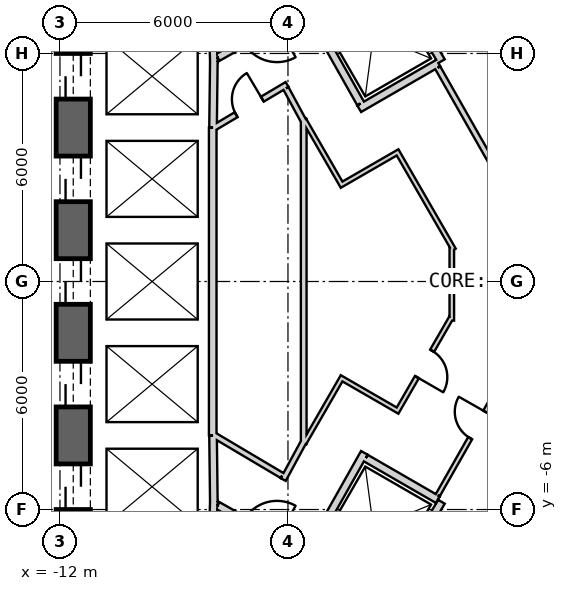
"""IFC4 building model, lengths in metres.
Left out: names, types, materials, properties, quantities, classifications, styles, units other than length and angle.
Written with IfcOpenShell. Run it as: python <this file> out.ifc"""

import sys

from ifc_helpers import new_model, si_unit, direction, frame, frame_2d, origin, place, context, subcontext, project, spatial, rectangle, extrude, element, fill, save


model = new_model("IFC4")
c1 = context("Model", 3, precision=1e-05, world=origin(), true_north=direction((0.0, 1.0)))
c2 = subcontext(c1, "Body", "Model", "MODEL_VIEW")
j1 = project(units=[si_unit("LENGTHUNIT", "METRE"), si_unit("PLANEANGLEUNIT", "RADIAN")], contexts=[c1])
p1 = place(None, origin())
s1 = spatial("IfcSite", under=j1, at=p1, CompositionType="ELEMENT")
p2 = place(p1, origin())
s2 = spatial("IfcBuilding", under=s1, at=p2, CompositionType="ELEMENT")
p3 = place(p2, frame((0.0, 0.0, 277.2)))
s3 = spatial("IfcBuildingStorey", under=s2, at=p3, CompositionType="ELEMENT", Elevation=277.2)
p4 = place(p3, frame((19.475, 2.208, 0.0), z_axis=(0.0, 0.0, 1.0), x_axis=(-0.866028369851, 0.499994862586, 0.0)))
e1 = element("IfcWall", 1, at=p4, inside=s3, PredefinedType="SHEAR", context=c2, shape_type="SweptSolid", body=[
    extrude(rectangle(XDim=31.523, YDim=0.9, at=frame_2d((15.762, 0.0))), origin(), (0.0, 0.0, 1.0), 6.5),
])
p5 = place(p4, frame((7.062, 0.0, 0.0)))
e2 = element("IfcOpeningElement", 2, at=p5, cuts=e1, PredefinedType="OPENING", context=c2, shape_type="SweptSolid", body=[
    extrude(rectangle(XDim=1.2, YDim=2.4, at=frame_2d((0.6, 1.2))), frame((0.0, 0.46, 0.0), z_axis=(0.0, -1.0, 0.0), x_axis=(1.0, 0.0, 0.0)), (0.0, 0.0, 1.0), 0.92),
])
p6 = place(p4, frame((3.612, 0.0, 0.0)))
e3 = element("IfcOpeningElement", 3, at=p6, cuts=e1, PredefinedType="OPENING", context=c2, shape_type="SweptSolid", body=[
    extrude(rectangle(XDim=1.2, YDim=2.4, at=frame_2d((0.6, 1.2))), frame((0.0, 0.46, 0.0), z_axis=(0.0, -1.0, 0.0), x_axis=(1.0, 0.0, 0.0)), (0.0, 0.0, 1.0), 0.92),
])
p7 = place(p4, frame((26.712, 0.0, 0.0)))
e4 = element("IfcOpeningElement", 4, at=p7, cuts=e1, PredefinedType="OPENING", context=c2, shape_type="SweptSolid", body=[
    extrude(rectangle(XDim=1.2, YDim=2.4, at=frame_2d((0.6, 1.2))), frame((0.0, 0.46, 0.0), z_axis=(0.0, -1.0, 0.0), x_axis=(1.0, 0.0, 0.0)), (0.0, 0.0, 1.0), 0.92),
])
p8 = place(p3, frame((-11.65, 15.762, 0.0), z_axis=(0.0, 0.0, 1.0), x_axis=(0.0, -1.0, 0.0)))
e5 = element("IfcWall", 5, at=p8, inside=s3, PredefinedType="SHEAR", context=c2, shape_type="SweptSolid", body=[
    extrude(rectangle(XDim=31.523, YDim=0.9, at=frame_2d((15.762, 0.0))), origin(), (0.0, 0.0, 1.0), 6.5),
])
p9 = place(p8, frame((7.062, 0.0, 0.0)))
e6 = element("IfcOpeningElement", 6, at=p9, cuts=e5, PredefinedType="OPENING", context=c2, shape_type="SweptSolid", body=[
    extrude(rectangle(XDim=1.2, YDim=2.4, at=frame_2d((0.6, 1.2))), frame((0.0, 0.46, 0.0), z_axis=(0.0, -1.0, 0.0), x_axis=(1.0, 0.0, 0.0)), (0.0, 0.0, 1.0), 0.92),
])
p10 = place(p8, frame((9.762, 0.0, 0.0)))
e7 = element("IfcOpeningElement", 7, at=p10, cuts=e5, PredefinedType="OPENING", context=c2, shape_type="SweptSolid", body=[
    extrude(rectangle(XDim=1.2, YDim=2.4, at=frame_2d((0.6, 1.2))), frame((0.0, 0.46, 0.0), z_axis=(0.0, -1.0, 0.0), x_axis=(1.0, 0.0, 0.0)), (0.0, 0.0, 1.0), 0.92),
])
p11 = place(p8, frame((12.462, 0.0, 0.0)))
e8 = element("IfcOpeningElement", 8, at=p11, cuts=e5, PredefinedType="OPENING", context=c2, shape_type="SweptSolid", body=[
    extrude(rectangle(XDim=1.2, YDim=2.4, at=frame_2d((0.6, 1.2))), frame((0.0, 0.46, 0.0), z_axis=(0.0, -1.0, 0.0), x_axis=(1.0, 0.0, 0.0)), (0.0, 0.0, 1.0), 0.92),
])
p12 = place(p8, frame((15.162, 0.0, 0.0)))
e9 = element("IfcOpeningElement", 9, at=p12, cuts=e5, PredefinedType="OPENING", context=c2, shape_type="SweptSolid", body=[
    extrude(rectangle(XDim=1.2, YDim=2.4, at=frame_2d((0.6, 1.2))), frame((0.0, 0.46, 0.0), z_axis=(0.0, -1.0, 0.0), x_axis=(1.0, 0.0, 0.0)), (0.0, 0.0, 1.0), 0.92),
])
p13 = place(p8, frame((17.862, 0.0, 0.0)))
e10 = element("IfcOpeningElement", 10, at=p13, cuts=e5, PredefinedType="OPENING", context=c2, shape_type="SweptSolid", body=[
    extrude(rectangle(XDim=1.2, YDim=2.4, at=frame_2d((0.6, 1.2))), frame((0.0, 0.46, 0.0), z_axis=(0.0, -1.0, 0.0), x_axis=(1.0, 0.0, 0.0)), (0.0, 0.0, 1.0), 0.92),
])
p14 = place(p8, frame((20.562, 0.0, 0.0)))
e11 = element("IfcOpeningElement", 11, at=p14, cuts=e5, PredefinedType="OPENING", context=c2, shape_type="SweptSolid", body=[
    extrude(rectangle(XDim=1.2, YDim=2.4, at=frame_2d((0.6, 1.2))), frame((0.0, 0.46, 0.0), z_axis=(0.0, -1.0, 0.0), x_axis=(1.0, 0.0, 0.0)), (0.0, 0.0, 1.0), 0.92),
])
p15 = place(p8, frame((23.262, 0.0, 0.0)))
e12 = element("IfcOpeningElement", 12, at=p15, cuts=e5, PredefinedType="OPENING", context=c2, shape_type="SweptSolid", body=[
    extrude(rectangle(XDim=1.2, YDim=2.4, at=frame_2d((0.6, 1.2))), frame((0.0, 0.46, 0.0), z_axis=(0.0, -1.0, 0.0), x_axis=(1.0, 0.0, 0.0)), (0.0, 0.0, 1.0), 0.92),
])
p16 = place(p8, frame((3.612, 0.0, 0.0)))
e13 = element("IfcOpeningElement", 13, at=p16, cuts=e5, PredefinedType="OPENING", context=c2, shape_type="SweptSolid", body=[
    extrude(rectangle(XDim=1.2, YDim=2.4, at=frame_2d((0.6, 1.2))), frame((0.0, 0.46, 0.0), z_axis=(0.0, -1.0, 0.0), x_axis=(1.0, 0.0, 0.0)), (0.0, 0.0, 1.0), 0.92),
])
p17 = place(p8, frame((26.712, 0.0, 0.0)))
e14 = element("IfcOpeningElement", 14, at=p17, cuts=e5, PredefinedType="OPENING", context=c2, shape_type="SweptSolid", body=[
    extrude(rectangle(XDim=1.2, YDim=2.4, at=frame_2d((0.6, 1.2))), frame((0.0, 0.46, 0.0), z_axis=(0.0, -1.0, 0.0), x_axis=(1.0, 0.0, 0.0)), (0.0, 0.0, 1.0), 0.92),
])
p18 = place(p3, frame((-7.825, -17.97, 0.0), z_axis=(0.0, 0.0, 1.0), x_axis=(0.866028369851, 0.499994862586, 0.0)))
e15 = element("IfcWall", 15, at=p18, inside=s3, PredefinedType="SHEAR", context=c2, shape_type="SweptSolid", body=[
    extrude(rectangle(XDim=31.523, YDim=0.9, at=frame_2d((15.762, 0.0))), origin(), (0.0, 0.0, 1.0), 6.5),
])
p19 = place(p18, frame((7.062, 0.0, 0.0)))
e16 = element("IfcOpeningElement", 16, at=p19, cuts=e15, PredefinedType="OPENING", context=c2, shape_type="SweptSolid", body=[
    extrude(rectangle(XDim=1.2, YDim=2.4, at=frame_2d((0.6, 1.2))), frame((0.0, 0.46, 0.0), z_axis=(0.0, -1.0, 0.0), x_axis=(1.0, 0.0, 0.0)), (0.0, 0.0, 1.0), 0.92),
])
p20 = place(p18, frame((9.762, 0.0, 0.0)))
e17 = element("IfcOpeningElement", 17, at=p20, cuts=e15, PredefinedType="OPENING", context=c2, shape_type="SweptSolid", body=[
    extrude(rectangle(XDim=1.2, YDim=2.4, at=frame_2d((0.6, 1.2))), frame((0.0, 0.46, 0.0), z_axis=(0.0, -1.0, 0.0), x_axis=(1.0, 0.0, 0.0)), (0.0, 0.0, 1.0), 0.92),
])
p21 = place(p18, frame((12.462, 0.0, 0.0)))
e18 = element("IfcOpeningElement", 18, at=p21, cuts=e15, PredefinedType="OPENING", context=c2, shape_type="SweptSolid", body=[
    extrude(rectangle(XDim=1.2, YDim=2.4, at=frame_2d((0.6, 1.2))), frame((0.0, 0.46, 0.0), z_axis=(0.0, -1.0, 0.0), x_axis=(1.0, 0.0, 0.0)), (0.0, 0.0, 1.0), 0.92),
])
p22 = place(p18, frame((15.162, 0.0, 0.0)))
e19 = element("IfcOpeningElement", 19, at=p22, cuts=e15, PredefinedType="OPENING", context=c2, shape_type="SweptSolid", body=[
    extrude(rectangle(XDim=1.2, YDim=2.4, at=frame_2d((0.6, 1.2))), frame((0.0, 0.46, 0.0), z_axis=(0.0, -1.0, 0.0), x_axis=(1.0, 0.0, 0.0)), (0.0, 0.0, 1.0), 0.92),
])
p23 = place(p18, frame((17.862, 0.0, 0.0)))
e20 = element("IfcOpeningElement", 20, at=p23, cuts=e15, PredefinedType="OPENING", context=c2, shape_type="SweptSolid", body=[
    extrude(rectangle(XDim=1.2, YDim=2.4, at=frame_2d((0.6, 1.2))), frame((0.0, 0.46, 0.0), z_axis=(0.0, -1.0, 0.0), x_axis=(1.0, 0.0, 0.0)), (0.0, 0.0, 1.0), 0.92),
])
p24 = place(p18, frame((20.562, 0.0, 0.0)))
e21 = element("IfcOpeningElement", 21, at=p24, cuts=e15, PredefinedType="OPENING", context=c2, shape_type="SweptSolid", body=[
    extrude(rectangle(XDim=1.2, YDim=2.4, at=frame_2d((0.6, 1.2))), frame((0.0, 0.46, 0.0), z_axis=(0.0, -1.0, 0.0), x_axis=(1.0, 0.0, 0.0)), (0.0, 0.0, 1.0), 0.92),
])
p25 = place(p18, frame((26.712, 0.0, 0.0)))
e22 = element("IfcOpeningElement", 22, at=p25, cuts=e15, PredefinedType="OPENING", context=c2, shape_type="SweptSolid", body=[
    extrude(rectangle(XDim=1.2, YDim=2.4, at=frame_2d((0.6, 1.2))), frame((0.0, 0.46, 0.0), z_axis=(0.0, -1.0, 0.0), x_axis=(1.0, 0.0, 0.0)), (0.0, 0.0, 1.0), 0.92),
])
p26 = place(p18, frame((3.612, 0.0, 0.0)))
e23 = element("IfcOpeningElement", 23, at=p26, cuts=e15, PredefinedType="OPENING", context=c2, shape_type="SweptSolid", body=[
    extrude(rectangle(XDim=1.2, YDim=2.4, at=frame_2d((0.6, 1.2))), frame((0.0, 0.46, 0.0), z_axis=(0.0, -1.0, 0.0), x_axis=(1.0, 0.0, 0.0)), (0.0, 0.0, 1.0), 0.92),
])
p27 = place(p3, frame((-7.977, 6.65, 0.0), z_axis=(0.0, 0.0, 1.0), x_axis=(0.030861509705, -0.999523670164, 0.0)))
e24 = element("IfcWall", 24, at=p27, inside=s3, PredefinedType="PLUMBINGWALL", context=c2, shape_type="SweptSolid", body=[
    extrude(rectangle(XDim=0.878, YDim=0.2, at=frame_2d((0.439, 0.0))), origin(), (0.0, 0.0, 1.0), 6.1),
])
p28 = place(p3, frame((-7.949, 5.895, 0.0), z_axis=(0.0, 0.0, 1.0), x_axis=(-0.012042535896, -0.999927486035, 0.0)))
e25 = element("IfcWall", 25, at=p28, inside=s3, PredefinedType="PLUMBINGWALL", context=c2, shape_type="SweptSolid", body=[
    extrude(rectangle(XDim=1.845, YDim=0.2, at=frame_2d((0.922, 0.0))), origin(), (0.0, 0.0, 1.0), 6.1),
])
p29 = place(p3, frame((-7.98, 4.05, 0.0), z_axis=(0.0, 0.0, 1.0), x_axis=(0.0, -1.0, 0.0)))
e26 = element("IfcWall", 26, at=p29, inside=s3, PredefinedType="PLUMBINGWALL", context=c2, shape_type="SweptSolid", body=[
    extrude(rectangle(XDim=8.1, YDim=0.2, at=frame_2d((4.05, 0.0))), origin(), (0.0, 0.0, 1.0), 6.1),
])
p30 = place(p3, frame((-7.95, -5.772, 0.0), z_axis=(0.0, 0.0, 1.0), x_axis=(-0.030803413295, -0.999525462272, 0.0)))
e27 = element("IfcWall", 27, at=p30, inside=s3, PredefinedType="PLUMBINGWALL", context=c2, shape_type="SweptSolid", body=[
    extrude(rectangle(XDim=1.078, YDim=0.2, at=frame_2d((0.539, 0.0))), origin(), (0.0, 0.0, 1.0), 6.1),
])
p31 = place(p3, frame((-7.971, -4.05, 0.0), z_axis=(0.0, 0.0, 1.0), x_axis=(0.012042535896, -0.999927486035, 0.0)))
e28 = element("IfcWall", 28, at=p31, inside=s3, PredefinedType="PLUMBINGWALL", context=c2, shape_type="SweptSolid", body=[
    extrude(rectangle(XDim=1.845, YDim=0.2, at=frame_2d((0.922, 0.0))), origin(), (0.0, 0.0, 1.0), 6.1),
])
p32 = place(p3, frame((-3.538, 8.465, 0.0), z_axis=(0.0, 0.0, 1.0), x_axis=(0.508647062354, -0.860975125052, 0.0)))
e29 = element("IfcWall", 29, at=p32, inside=s3, PredefinedType="PLUMBINGWALL", context=c2, shape_type="SweptSolid", body=[
    extrude(rectangle(XDim=3.1, YDim=0.2, at=frame_2d((1.55, 0.0))), origin(), (0.0, 0.0, 1.0), 6.1),
])
p33 = place(p3, frame((-2.043, 5.748, 0.0), z_axis=(0.0, 0.0, 1.0), x_axis=(-0.866035096217, -0.499983211839, 0.0)))
e30 = element("IfcWall", 30, at=p33, inside=s3, PredefinedType="PLUMBINGWALL", context=c2, shape_type="SweptSolid", body=[
    extrude(rectangle(XDim=2.404, YDim=0.2, at=frame_2d((1.202, 0.0))), origin(), (0.0, 0.0, 1.0), 6.1),
])
p34 = place(p3, frame((-5.562, 7.296, 0.0), z_axis=(0.0, 0.0, 1.0), x_axis=(0.49134651263, -0.870964180966, 0.0)))
e31 = element("IfcWall", 31, at=p34, inside=s3, PredefinedType="PLUMBINGWALL", context=c2, shape_type="SweptSolid", body=[
    extrude(rectangle(XDim=3.0, YDim=0.2, at=frame_2d((1.5, 0.0))), origin(), (0.0, 0.0, 1.0), 6.1),
])
p35 = place(p3, frame((-1.961, -5.796, 0.0), z_axis=(0.0, 0.0, 1.0), x_axis=(-0.508647062354, -0.860975125052, 0.0)))
e32 = element("IfcWall", 32, at=p35, inside=s3, PredefinedType="PLUMBINGWALL", context=c2, shape_type="SweptSolid", body=[
    extrude(rectangle(XDim=3.1, YDim=0.2, at=frame_2d((1.55, 0.0))), origin(), (0.0, 0.0, 1.0), 6.1),
])
p36 = place(p3, frame((-3.99, -4.509, 0.0), z_axis=(0.0, 0.0, 1.0), x_axis=(-0.491358283181, -0.870957540612, 0.0)))
e33 = element("IfcWall", 33, at=p36, inside=s3, PredefinedType="PLUMBINGWALL", context=c2, shape_type="SweptSolid", body=[
    extrude(rectangle(XDim=3.2, YDim=0.2, at=frame_2d((1.6, 0.0))), origin(), (0.0, 0.0, 1.0), 6.1),
])
p37 = place(p3, frame((-3.953, -4.646, 0.0), z_axis=(0.0, 0.0, 1.0), x_axis=(0.866038900241, -0.499976622722, 0.0)))
e34 = element("IfcWall", 34, at=p37, inside=s3, PredefinedType="PLUMBINGWALL", context=c2, shape_type="SweptSolid", body=[
    extrude(rectangle(XDim=2.189, YDim=0.2, at=frame_2d((1.095, 0.0))), origin(), (0.0, 0.0, 1.0), 6.1),
])
p38 = place(p3, frame((-5.6, 7.16, 0.0), z_axis=(0.0, 0.0, 1.0), x_axis=(-0.871363259478, -0.490638431059, 0.0)))
e35 = element("IfcWall", 35, at=p38, inside=s3, PredefinedType="PARTITIONING", context=c2, shape_type="SweptSolid", body=[
    extrude(rectangle(XDim=2.581, YDim=0.2, at=frame_2d((1.291, 0.0))), origin(), (0.0, 0.0, 1.0), 6.1),
])
p39 = place(p38, frame((0.791, 0.0, 0.0)))
e36 = element("IfcOpeningElement", 36, at=p39, cuts=e35, PredefinedType="OPENING", context=c2, shape_type="SweptSolid", body=[
    extrude(rectangle(XDim=1.0, YDim=2.1, at=frame_2d((0.5, 1.05))), frame((0.0, 0.11, 0.0), z_axis=(0.0, -1.0, 0.0), x_axis=(1.0, 0.0, 0.0)), (0.0, 0.0, 1.0), 0.22),
])
p40 = place(p3, frame((-7.849, -5.894, 0.0), z_axis=(0.0, 0.0, 1.0), x_axis=(0.871363259478, -0.490638431059, 0.0)))
e37 = element("IfcWall", 37, at=p40, inside=s3, PredefinedType="PARTITIONING", context=c2, shape_type="SweptSolid", body=[
    extrude(rectangle(XDim=2.581, YDim=0.2, at=frame_2d((1.291, 0.0))), origin(), (0.0, 0.0, 1.0), 6.1),
])
p41 = place(p40, frame((0.791, 0.0, 0.0)))
e38 = element("IfcOpeningElement", 38, at=p41, cuts=e37, PredefinedType="OPENING", context=c2, shape_type="SweptSolid", body=[
    extrude(rectangle(XDim=1.0, YDim=2.1, at=frame_2d((0.5, 1.05))), frame((0.0, 0.11, 0.0), z_axis=(0.0, -1.0, 0.0), x_axis=(1.0, 0.0, 0.0)), (0.0, 0.0, 1.0), 0.22),
])
p42 = place(p3, frame((-2.059, 5.624, 0.0), z_axis=(0.0, 0.0, 1.0), x_axis=(0.494149180773, -0.869377125959, 0.0)))
e39 = element("IfcWall", 39, at=p42, inside=s3, PredefinedType="PLUMBINGWALL", context=c2, shape_type="SweptSolid", body=[
    extrude(rectangle(XDim=4.231, YDim=0.15, at=frame_2d((2.116, 0.0))), origin(), (0.0, 0.0, 1.0), 6.1),
])
p43 = place(p3, frame((0.094, -1.836, 0.0), z_axis=(0.0, 0.0, 1.0), x_axis=(-0.494097972448, -0.869406230495, 0.0)))
e40 = element("IfcWall", 40, at=p43, inside=s3, PredefinedType="PARTITIONING", context=c2, shape_type="SweptSolid", body=[
    extrude(rectangle(XDim=4.357, YDim=0.12, at=frame_2d((2.179, 0.0))), origin(), (0.0, 0.0, 1.0), 6.1),
])
p44 = place(p43, frame((1.83, 0.0, 0.0)))
e41 = element("IfcOpeningElement", 41, at=p44, cuts=e40, PredefinedType="OPENING", context=c2, shape_type="SweptSolid", body=[
    extrude(rectangle(XDim=0.8, YDim=2.1, at=frame_2d((0.4, 1.05))), frame((0.0, 0.07, 0.0), z_axis=(0.0, -1.0, 0.0), x_axis=(1.0, 0.0, 0.0)), (0.0, 0.0, 1.0), 0.14),
])
p45 = place(p3, frame((-5.586, -4.275, 0.0), z_axis=(0.0, 0.0, 1.0), x_axis=(0.0, 1.0, 0.0)))
e42 = element("IfcWall", 42, at=p45, inside=s3, PredefinedType="PLUMBINGWALL", context=c2, shape_type="SweptSolid", body=[
    extrude(rectangle(XDim=8.549, YDim=0.15, at=frame_2d((4.275, 0.0))), origin(), (0.0, 0.0, 1.0), 6.1),
])
p46 = place(p3, frame((-6.124, -5.211, 0.0), z_axis=(0.0, 0.0, 1.0), x_axis=(0.476228984866, 0.879321303036, 0.0)))
e43 = element("IfcWall", 43, at=p46, inside=s3, PredefinedType="PLUMBINGWALL", context=c2, shape_type="SweptSolid", body=[
    extrude(rectangle(XDim=1.162, YDim=0.15, at=frame_2d((0.581, 0.0))), origin(), (0.0, 0.0, 1.0), 6.1),
])
p47 = place(p3, frame((-7.95, -4.041, 0.0), z_axis=(0.0, 0.0, 1.0), x_axis=(0.860090281069, -0.510141851263, 0.0)))
e44 = element("IfcWall", 44, at=p47, inside=s3, PredefinedType="PLUMBINGWALL", context=c2, shape_type="SweptSolid", body=[
    extrude(rectangle(XDim=2.089, YDim=0.15, at=frame_2d((1.045, 0.0))), origin(), (0.0, 0.0, 1.0), 6.1),
])
p48 = place(p3, frame((-6.024, 5.183, 0.0), z_axis=(0.0, 0.0, 1.0), x_axis=(-0.860126804455, -0.510080268447, 0.0)))
e45 = element("IfcWall", 45, at=p48, inside=s3, PredefinedType="PLUMBINGWALL", context=c2, shape_type="SweptSolid", body=[
    extrude(rectangle(XDim=2.24, YDim=0.15, at=frame_2d((1.12, 0.0))), origin(), (0.0, 0.0, 1.0), 6.1),
])
p49 = place(p48, frame((0.757, 0.0, 0.0)))
e46 = element("IfcOpeningElement", 46, at=p49, cuts=e45, PredefinedType="OPENING", context=c2, shape_type="SweptSolid", body=[
    extrude(rectangle(XDim=0.8, YDim=2.1, at=frame_2d((0.4, 1.05))), frame((0.0, 0.085, 0.0), z_axis=(0.0, -1.0, 0.0), x_axis=(1.0, 0.0, 0.0)), (0.0, 0.0, 1.0), 0.17),
])
p50 = place(p3, frame((-5.571, 4.19, 0.0), z_axis=(0.0, 0.0, 1.0), x_axis=(-0.476127658675, 0.879376172434, 0.0)))
e47 = element("IfcWall", 47, at=p50, inside=s3, PredefinedType="PLUMBINGWALL", context=c2, shape_type="SweptSolid", body=[
    extrude(rectangle(XDim=1.012, YDim=0.15, at=frame_2d((0.506, 0.0))), origin(), (0.0, 0.0, 1.0), 6.1),
])
p51 = place(p3, frame((-4.558, 2.495, 0.0), z_axis=(0.0, 0.0, 1.0), x_axis=(-0.499990325971, 0.866030989016, 0.0)))
e48 = element("IfcWall", 48, at=p51, inside=s3, PredefinedType="PARTITIONING", context=c2, shape_type="SweptSolid", body=[
    extrude(rectangle(XDim=2.025, YDim=0.12, at=frame_2d((1.012, 0.0))), origin(), (0.0, 0.0, 1.0), 6.1),
])
p52 = place(p3, frame((-3.064, 3.427, 0.0), z_axis=(0.0, 0.0, 1.0), x_axis=(-0.866087547558, -0.499892348375, 0.0)))
e49 = element("IfcWall", 49, at=p52, inside=s3, PredefinedType="PARTITIONING", context=c2, shape_type="SweptSolid", body=[
    extrude(rectangle(XDim=1.7, YDim=0.12, at=frame_2d((0.85, 0.0))), origin(), (0.0, 0.0, 1.0), 6.1),
])
p53 = place(p3, frame((-1.637, 0.835, 0.0), z_axis=(0.0, 0.0, 1.0), x_axis=(-0.499980071345, 0.866036909293, 0.0)))
e50 = element("IfcWall", 50, at=p53, inside=s3, PredefinedType="PARTITIONING", context=c2, shape_type="SweptSolid", body=[
    extrude(rectangle(XDim=2.898, YDim=0.12, at=frame_2d((1.449, 0.0))), origin(), (0.0, 0.0, 1.0), 6.1),
])
p54 = place(p3, frame((-1.689, -1.029, 0.0), z_axis=(0.0, 0.0, 1.0), x_axis=(0.0, 1.0, 0.0)))
e51 = element("IfcWall", 51, at=p54, inside=s3, PredefinedType="PARTITIONING", context=c2, shape_type="SweptSolid", body=[
    extrude(rectangle(XDim=1.935, YDim=0.12, at=frame_2d((0.968, 0.0))), origin(), (0.0, 0.0, 1.0), 6.1),
])
p55 = place(p3, frame((-3.146, -3.449, 0.0), z_axis=(0.0, 0.0, 1.0), x_axis=(0.500028961621, 0.866008682139, 0.0)))
e52 = element("IfcWall", 52, at=p55, inside=s3, PredefinedType="PARTITIONING", context=c2, shape_type="SweptSolid", body=[
    extrude(rectangle(XDim=2.896, YDim=0.12, at=frame_2d((1.448, 0.0))), origin(), (0.0, 0.0, 1.0), 6.1),
])
p56 = place(p55, frame((1.078, 0.0, 0.0)))
e53 = element("IfcOpeningElement", 53, at=p56, cuts=e52, PredefinedType="OPENING", context=c2, shape_type="SweptSolid", body=[
    extrude(rectangle(XDim=0.8, YDim=2.1, at=frame_2d((0.4, 1.05))), frame((0.0, 0.07, 0.0), z_axis=(0.0, -1.0, 0.0), x_axis=(1.0, 0.0, 0.0)), (0.0, 0.0, 1.0), 0.14),
])
p57 = place(p3, frame((-4.64, -2.517, 0.0), z_axis=(0.0, 0.0, 1.0), x_axis=(0.865989465428, -0.500062241894, 0.0)))
e54 = element("IfcWall", 54, at=p57, inside=s3, PredefinedType="PARTITIONING", context=c2, shape_type="SweptSolid", body=[
    extrude(rectangle(XDim=1.7, YDim=0.12, at=frame_2d((0.85, 0.0))), origin(), (0.0, 0.0, 1.0), 6.1),
])
p58 = place(p3, frame((-5.571, -4.249, 0.0), z_axis=(0.0, 0.0, 1.0), x_axis=(0.500081145431, 0.865978549379, 0.0)))
e55 = element("IfcWall", 55, at=p58, inside=s3, PredefinedType="PARTITIONING", context=c2, shape_type="SweptSolid", body=[
    extrude(rectangle(XDim=1.905, YDim=0.12, at=frame_2d((0.953, 0.0))), origin(), (0.0, 0.0, 1.0), 6.1),
])
p59 = place(p44, origin())
e56 = element("IfcDoor", 56, at=p59, inside=s3, OperationType="SINGLE_SWING_LEFT", PredefinedType="USERDEFINED", context=c2, shape_type="SweptSolid", body=[
    extrude(rectangle(XDim=0.8, YDim=2.1, at=frame_2d((0.4, 1.05))), frame((0.0, 0.025, 0.0), z_axis=(0.0, -1.0, 0.0), x_axis=(1.0, 0.0, 0.0)), (0.0, 0.0, 1.0), 0.05),
])
fill(e41, e56)
p60 = place(p49, origin())
e57 = element("IfcDoor", 57, at=p60, inside=s3, OperationType="SINGLE_SWING_LEFT", PredefinedType="USERDEFINED", context=c2, shape_type="SweptSolid", body=[
    extrude(rectangle(XDim=0.8, YDim=2.1, at=frame_2d((0.4, 1.05))), frame((0.0, 0.025, 0.0), z_axis=(0.0, -1.0, 0.0), x_axis=(1.0, 0.0, 0.0)), (0.0, 0.0, 1.0), 0.05),
])
fill(e46, e57)
p61 = place(p56, origin())
e58 = element("IfcDoor", 58, at=p61, inside=s3, OperationType="SINGLE_SWING_LEFT", PredefinedType="USERDEFINED", context=c2, shape_type="SweptSolid", body=[
    extrude(rectangle(XDim=0.8, YDim=2.1, at=frame_2d((0.4, 1.05))), frame((0.0, 0.025, 0.0), z_axis=(0.0, -1.0, 0.0), x_axis=(1.0, 0.0, 0.0)), (0.0, 0.0, 1.0), 0.05),
])
fill(e53, e58)
p62 = place(p10, origin())
e59 = element("IfcDoor", 59, at=p62, inside=s3, OperationType="SLIDING_TO_LEFT", PredefinedType="USERDEFINED", context=c2, shape_type="SweptSolid", body=[
    extrude(rectangle(XDim=1.2, YDim=2.4, at=frame_2d((0.6, 1.2))), frame((0.0, 0.025, 0.0), z_axis=(0.0, -1.0, 0.0), x_axis=(1.0, 0.0, 0.0)), (0.0, 0.0, 1.0), 0.05),
])
fill(e7, e59)
p63 = place(p11, origin())
e60 = element("IfcDoor", 60, at=p63, inside=s3, OperationType="SLIDING_TO_LEFT", PredefinedType="USERDEFINED", context=c2, shape_type="SweptSolid", body=[
    extrude(rectangle(XDim=1.2, YDim=2.4, at=frame_2d((0.6, 1.2))), frame((0.0, 0.025, 0.0), z_axis=(0.0, -1.0, 0.0), x_axis=(1.0, 0.0, 0.0)), (0.0, 0.0, 1.0), 0.05),
])
fill(e8, e60)
p64 = place(p12, origin())
e61 = element("IfcDoor", 61, at=p64, inside=s3, OperationType="SLIDING_TO_LEFT", PredefinedType="USERDEFINED", context=c2, shape_type="SweptSolid", body=[
    extrude(rectangle(XDim=1.2, YDim=2.4, at=frame_2d((0.6, 1.2))), frame((0.0, 0.025, 0.0), z_axis=(0.0, -1.0, 0.0), x_axis=(1.0, 0.0, 0.0)), (0.0, 0.0, 1.0), 0.05),
])
fill(e9, e61)
p65 = place(p13, origin())
e62 = element("IfcDoor", 62, at=p65, inside=s3, OperationType="SLIDING_TO_LEFT", PredefinedType="USERDEFINED", context=c2, shape_type="SweptSolid", body=[
    extrude(rectangle(XDim=1.2, YDim=2.4, at=frame_2d((0.6, 1.2))), frame((0.0, 0.025, 0.0), z_axis=(0.0, -1.0, 0.0), x_axis=(1.0, 0.0, 0.0)), (0.0, 0.0, 1.0), 0.05),
])
fill(e10, e62)
p66 = place(p14, origin())
e63 = element("IfcDoor", 63, at=p66, inside=s3, OperationType="SLIDING_TO_LEFT", PredefinedType="USERDEFINED", context=c2, shape_type="SweptSolid", body=[
    extrude(rectangle(XDim=1.2, YDim=2.4, at=frame_2d((0.6, 1.2))), frame((0.0, 0.025, 0.0), z_axis=(0.0, -1.0, 0.0), x_axis=(1.0, 0.0, 0.0)), (0.0, 0.0, 1.0), 0.05),
])
fill(e11, e63)
save(model, sys.argv[1])
